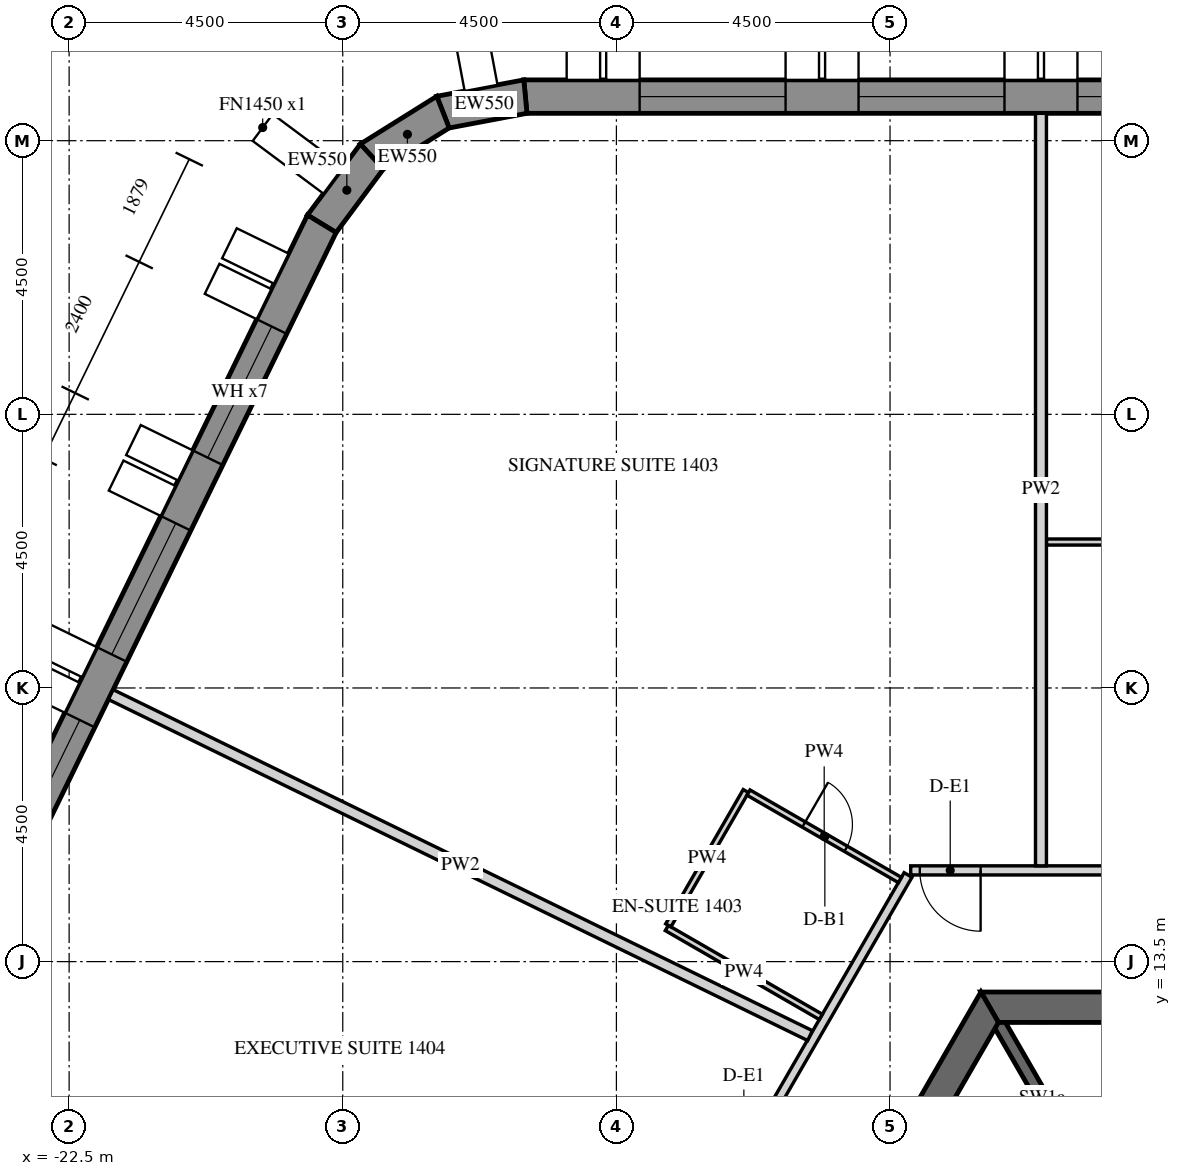
"""IFC4 building model, lengths in metres.
Left out: names, types, materials, properties, quantities, classifications, styles, units other than length and angle.
Written with IfcOpenShell. Run it as: python <this file> out.ifc"""

import sys

from ifc_helpers import new_model, si_unit, direction, frame, frame_2d, origin, place, context, subcontext, project, spatial, polyline, rectangle, outline, extrude, element, fill, save


model = new_model("IFC4")
c1 = context("Model", 3, precision=1e-05, world=origin(), true_north=direction((0.0, 1.0)))
c2 = subcontext(c1, "Body", "Model", "MODEL_VIEW")
j1 = project(units=[si_unit("LENGTHUNIT", "METRE"), si_unit("PLANEANGLEUNIT", "RADIAN")], contexts=[c1])
p1 = place(None, origin())
s1 = spatial("IfcSite", under=j1, at=p1, CompositionType="ELEMENT")
p2 = place(p1, origin())
s2 = spatial("IfcBuilding", under=s1, at=p2, CompositionType="ELEMENT")
p3 = place(p2, frame((0.0, 0.0, 183.9)))
s3 = spatial("IfcBuildingStorey", under=s2, at=p3, CompositionType="ELEMENT", Elevation=183.9)
p4 = place(p3, frame((12.761, 27.725, -0.15), z_axis=(0.0, 0.0, 1.0), x_axis=(-1.0, 0.0, 0.0)))
e1 = element("IfcWall", 1, at=p4, inside=s3, PredefinedType="SOLIDWALL", context=c2, shape_type="SweptSolid", body=[
    extrude(outline(polyline([(-0.022, -0.275), (27.783, -0.275), (27.732, 0.275), (0.022, 0.275), (-0.022, -0.275)])), origin(), (0.0, 0.0, 1.0), 3.9),
])
p5 = place(p4, frame((1.879, 0.0, 1.05)))
e2 = element("IfcOpeningElement", 2, at=p5, cuts=e1, PredefinedType="OPENING", context=c2, shape_type="SweptSolid", body=[
    extrude(rectangle(XDim=2.4, YDim=2.4, at=frame_2d((1.2, 1.2))), frame((0.0, 0.285, 0.0), z_axis=(0.0, -1.0, 0.0), x_axis=(1.0, 0.0, 0.0)), (0.0, 0.0, 1.0), 0.57),
])
p6 = place(p4, frame((5.479, 0.0, 1.05)))
e3 = element("IfcOpeningElement", 3, at=p6, cuts=e1, PredefinedType="OPENING", context=c2, shape_type="SweptSolid", body=[
    extrude(rectangle(XDim=2.4, YDim=2.4, at=frame_2d((1.2, 1.2))), frame((0.0, 0.285, 0.0), z_axis=(0.0, -1.0, 0.0), x_axis=(1.0, 0.0, 0.0)), (0.0, 0.0, 1.0), 0.57),
])
p7 = place(p4, frame((9.079, 0.0, 1.05)))
e4 = element("IfcOpeningElement", 4, at=p7, cuts=e1, PredefinedType="OPENING", context=c2, shape_type="SweptSolid", body=[
    extrude(rectangle(XDim=2.4, YDim=2.4, at=frame_2d((1.2, 1.2))), frame((0.0, 0.285, 0.0), z_axis=(0.0, -1.0, 0.0), x_axis=(1.0, 0.0, 0.0)), (0.0, 0.0, 1.0), 0.57),
])
p8 = place(p4, frame((12.679, 0.0, 1.05)))
e5 = element("IfcOpeningElement", 5, at=p8, cuts=e1, PredefinedType="OPENING", context=c2, shape_type="SweptSolid", body=[
    extrude(rectangle(XDim=2.4, YDim=2.4, at=frame_2d((1.2, 1.2))), frame((0.0, 0.285, 0.0), z_axis=(0.0, -1.0, 0.0), x_axis=(1.0, 0.0, 0.0)), (0.0, 0.0, 1.0), 0.57),
])
p9 = place(p4, frame((16.279, 0.0, 1.05)))
e6 = element("IfcOpeningElement", 6, at=p9, cuts=e1, PredefinedType="OPENING", context=c2, shape_type="SweptSolid", body=[
    extrude(rectangle(XDim=2.4, YDim=2.4, at=frame_2d((1.2, 1.2))), frame((0.0, 0.285, 0.0), z_axis=(0.0, -1.0, 0.0), x_axis=(1.0, 0.0, 0.0)), (0.0, 0.0, 1.0), 0.57),
])
p10 = place(p4, frame((19.879, 0.0, 1.05)))
e7 = element("IfcOpeningElement", 7, at=p10, cuts=e1, PredefinedType="OPENING", context=c2, shape_type="SweptSolid", body=[
    extrude(rectangle(XDim=2.4, YDim=2.4, at=frame_2d((1.2, 1.2))), frame((0.0, 0.285, 0.0), z_axis=(0.0, -1.0, 0.0), x_axis=(1.0, 0.0, 0.0)), (0.0, 0.0, 1.0), 0.57),
])
p11 = place(p4, frame((23.479, 0.0, 1.05)))
e8 = element("IfcOpeningElement", 8, at=p11, cuts=e1, PredefinedType="OPENING", context=c2, shape_type="SweptSolid", body=[
    extrude(rectangle(XDim=2.4, YDim=2.4, at=frame_2d((1.2, 1.2))), frame((0.0, 0.285, 0.0), z_axis=(0.0, -1.0, 0.0), x_axis=(1.0, 0.0, 0.0)), (0.0, 0.0, 1.0), 0.57),
])
p12 = place(p3, frame((-14.997, 27.725, -0.15), z_axis=(0.0, 0.0, 1.0), x_axis=(-0.982705443133, -0.185175624845, 0.0)))
e9 = element("IfcWall", 9, at=p12, inside=s3, PredefinedType="SOLIDWALL", context=c2, shape_type="SweptSolid", body=[
    extrude(outline(polyline([(-0.026, -0.275), (1.431, -0.275), (1.327, 0.275), (0.026, 0.275), (-0.026, -0.275)])), origin(), (0.0, 0.0, 1.0), 3.9),
])
p13 = place(p3, frame((-16.352, 27.47, -0.15), z_axis=(0.0, 0.0, 1.0), x_axis=(-0.848057977594, -0.5299034503, 0.0)))
e10 = element("IfcWall", 10, at=p13, inside=s3, PredefinedType="SOLIDWALL", context=c2, shape_type="SweptSolid", body=[
    extrude(outline(polyline([(-0.052, -0.275), (1.431, -0.275), (1.327, 0.275), (0.052, 0.275), (-0.052, -0.275)])), origin(), (0.0, 0.0, 1.0), 3.9),
])
p14 = place(p3, frame((-17.521, 26.739, -0.15), z_axis=(0.0, 0.0, 1.0), x_axis=(-0.597135295884, -0.802140535324, 0.0)))
e11 = element("IfcWall", 11, at=p14, inside=s3, PredefinedType="SOLIDWALL", context=c2, shape_type="SweptSolid", body=[
    extrude(outline(polyline([(-0.052, -0.275), (1.405, -0.275), (1.354, 0.275), (0.052, 0.275), (-0.052, -0.275)])), origin(), (0.0, 0.0, 1.0), 3.9),
])
p15 = place(p3, frame((-18.345, 25.633, -0.15), z_axis=(0.0, 0.0, 1.0), x_axis=(-0.43837181828, -0.898793718791, 0.0)))
e12 = element("IfcWall", 12, at=p15, inside=s3, PredefinedType="SOLIDWALL", context=c2, shape_type="SweptSolid", body=[
    extrude(outline(polyline([(-0.026, -0.275), (27.78, -0.275), (27.735, 0.275), (0.026, 0.275), (-0.026, -0.275)])), origin(), (0.0, 0.0, 1.0), 3.9),
])
p16 = place(p15, frame((1.879, 0.0, 1.05)))
e13 = element("IfcOpeningElement", 13, at=p16, cuts=e12, PredefinedType="OPENING", context=c2, shape_type="SweptSolid", body=[
    extrude(rectangle(XDim=2.4, YDim=2.4, at=frame_2d((1.2, 1.2))), frame((0.0, 0.285, 0.0), z_axis=(0.0, -1.0, 0.0), x_axis=(1.0, 0.0, 0.0)), (0.0, 0.0, 1.0), 0.57),
])
p17 = place(p15, frame((5.479, 0.0, 1.05)))
e14 = element("IfcOpeningElement", 14, at=p17, cuts=e12, PredefinedType="OPENING", context=c2, shape_type="SweptSolid", body=[
    extrude(rectangle(XDim=2.4, YDim=2.4, at=frame_2d((1.2, 1.2))), frame((0.0, 0.285, 0.0), z_axis=(0.0, -1.0, 0.0), x_axis=(1.0, 0.0, 0.0)), (0.0, 0.0, 1.0), 0.57),
])
p18 = place(p15, frame((9.079, 0.0, 1.05)))
e15 = element("IfcOpeningElement", 15, at=p18, cuts=e12, PredefinedType="OPENING", context=c2, shape_type="SweptSolid", body=[
    extrude(rectangle(XDim=2.4, YDim=2.4, at=frame_2d((1.2, 1.2))), frame((0.0, 0.285, 0.0), z_axis=(0.0, -1.0, 0.0), x_axis=(1.0, 0.0, 0.0)), (0.0, 0.0, 1.0), 0.57),
])
p19 = place(p15, frame((12.679, 0.0, 1.05)))
e16 = element("IfcOpeningElement", 16, at=p19, cuts=e12, PredefinedType="OPENING", context=c2, shape_type="SweptSolid", body=[
    extrude(rectangle(XDim=2.4, YDim=2.4, at=frame_2d((1.2, 1.2))), frame((0.0, 0.285, 0.0), z_axis=(0.0, -1.0, 0.0), x_axis=(1.0, 0.0, 0.0)), (0.0, 0.0, 1.0), 0.57),
])
p20 = place(p15, frame((16.279, 0.0, 1.05)))
e17 = element("IfcOpeningElement", 17, at=p20, cuts=e12, PredefinedType="OPENING", context=c2, shape_type="SweptSolid", body=[
    extrude(rectangle(XDim=2.4, YDim=2.4, at=frame_2d((1.2, 1.2))), frame((0.0, 0.285, 0.0), z_axis=(0.0, -1.0, 0.0), x_axis=(1.0, 0.0, 0.0)), (0.0, 0.0, 1.0), 0.57),
])
p21 = place(p15, frame((19.879, 0.0, 1.05)))
e18 = element("IfcOpeningElement", 18, at=p21, cuts=e12, PredefinedType="OPENING", context=c2, shape_type="SweptSolid", body=[
    extrude(rectangle(XDim=2.4, YDim=2.4, at=frame_2d((1.2, 1.2))), frame((0.0, 0.285, 0.0), z_axis=(0.0, -1.0, 0.0), x_axis=(1.0, 0.0, 0.0)), (0.0, 0.0, 1.0), 0.57),
])
p22 = place(p15, frame((23.479, 0.0, 1.05)))
e19 = element("IfcOpeningElement", 19, at=p22, cuts=e12, PredefinedType="OPENING", context=c2, shape_type="SweptSolid", body=[
    extrude(rectangle(XDim=2.4, YDim=2.4, at=frame_2d((1.2, 1.2))), frame((0.0, 0.285, 0.0), z_axis=(0.0, -1.0, 0.0), x_axis=(1.0, 0.0, 0.0)), (0.0, 0.0, 1.0), 0.57),
])
p23 = place(p3, frame((-7.361, 12.75, -0.15), z_axis=(0.0, 0.0, 1.0), x_axis=(-0.50000571537, -0.866022103989, 0.0)))
e20 = element("IfcWall", 20, at=p23, inside=s3, PredefinedType="SHEAR", context=c2, shape_type="SweptSolid", body=[
    extrude(outline(polyline([(-0.144, -0.25), (14.867, -0.25), (14.578, 0.25), (0.144, 0.25), (-0.144, -0.25)])), origin(), (0.0, 0.0, 1.0), 3.9),
])
p24 = place(p23, frame((6.49, 0.0, 0.15)))
e21 = element("IfcOpeningElement", 21, at=p24, cuts=e20, PredefinedType="OPENING", context=c2, shape_type="SweptSolid", body=[
    extrude(rectangle(XDim=1.8, YDim=2.4, at=frame_2d((0.9, 1.2))), frame((0.0, 0.26, 0.0), z_axis=(0.0, -1.0, 0.0), x_axis=(1.0, 0.0, 0.0)), (0.0, 0.0, 1.0), 0.52),
])
p25 = place(p3, frame((7.361, 12.75, -0.15), z_axis=(0.0, 0.0, 1.0), x_axis=(-1.0, 0.0, 0.0)))
e22 = element("IfcWall", 22, at=p25, inside=s3, PredefinedType="SHEAR", context=c2, shape_type="SweptSolid", body=[
    extrude(outline(polyline([(-0.144, -0.25), (14.866, -0.25), (14.578, 0.25), (0.144, 0.25), (-0.144, -0.25)])), origin(), (0.0, 0.0, 1.0), 3.9),
])
p26 = place(p25, frame((6.761, 0.0, 0.15)))
e23 = element("IfcOpeningElement", 23, at=p26, cuts=e22, PredefinedType="OPENING", context=c2, shape_type="SweptSolid", body=[
    extrude(rectangle(XDim=1.2, YDim=2.4, at=frame_2d((0.6, 1.2))), frame((0.0, 0.26, 0.0), z_axis=(0.0, -1.0, 0.0), x_axis=(1.0, 0.0, 0.0)), (0.0, 0.0, 1.0), 0.52),
])
p27 = place(p3, frame((-5.773, 10.0, -0.15), z_axis=(0.0, 0.0, 1.0), x_axis=(-0.499995765644, 0.866027848477, 0.0)))
e24 = element("IfcWall", 24, at=p27, inside=s3, PredefinedType="SHEAR", context=c2, shape_type="SweptSolid", body=[
    extrude(rectangle(XDim=2.887, YDim=0.2, at=frame_2d((1.443, 0.0))), origin(), (0.0, 0.0, 1.0), 3.9),
])
p28 = place(p3, frame((6.207, 15.0, 0.0), z_axis=(0.0, 0.0, 1.0), x_axis=(-1.0, 0.0, 0.0)))
e25 = element("IfcWall", 25, at=p28, inside=s3, PredefinedType="PARTITIONING", context=c2, shape_type="SweptSolid", body=[
    extrude(rectangle(XDim=14.867, YDim=0.15, at=frame_2d((7.433, 0.0))), origin(), (0.0, 0.0, 1.0), 2.988),
])
p29 = place(p28, frame((8.224, 0.0, 0.0)))
e26 = element("IfcOpeningElement", 26, at=p29, cuts=e25, PredefinedType="OPENING", context=c2, shape_type="SweptSolid", body=[
    extrude(rectangle(XDim=1.0, YDim=2.1, at=frame_2d((0.5, 1.05))), frame((0.0, 0.085, 0.0), z_axis=(0.0, -1.0, 0.0), x_axis=(1.0, 0.0, 0.0)), (0.0, 0.0, 1.0), 0.17),
])
p30 = place(p28, frame((13.717, 0.0, 0.0)))
e27 = element("IfcOpeningElement", 27, at=p30, cuts=e25, PredefinedType="OPENING", context=c2, shape_type="SweptSolid", body=[
    extrude(rectangle(XDim=1.0, YDim=2.1, at=frame_2d((0.5, 1.05))), frame((0.0, 0.085, 0.0), z_axis=(0.0, -1.0, 0.0), x_axis=(1.0, 0.0, 0.0)), (0.0, 0.0, 1.0), 0.17),
])
p31 = place(p3, frame((-8.704, 14.925, 0.0), z_axis=(0.0, 0.0, 1.0), x_axis=(-0.499998228944, -0.866026426302, 0.0)))
e28 = element("IfcWall", 28, at=p31, inside=s3, PredefinedType="PARTITIONING", context=c2, shape_type="SweptSolid", body=[
    extrude(rectangle(XDim=14.867, YDim=0.15, at=frame_2d((7.433, 0.0))), origin(), (0.0, 0.0, 1.0), 2.988),
])
p32 = place(p31, frame((4.901, 0.0, 0.0)))
e29 = element("IfcOpeningElement", 29, at=p32, cuts=e28, PredefinedType="OPENING", context=c2, shape_type="SweptSolid", body=[
    extrude(rectangle(XDim=1.0, YDim=2.1, at=frame_2d((0.5, 1.05))), frame((0.0, 0.085, 0.0), z_axis=(0.0, -1.0, 0.0), x_axis=(1.0, 0.0, 0.0)), (0.0, 0.0, 1.0), 0.17),
])
p33 = place(p31, frame((13.284, 0.0, 0.0)))
e30 = element("IfcOpeningElement", 30, at=p33, cuts=e28, PredefinedType="OPENING", context=c2, shape_type="SweptSolid", body=[
    extrude(rectangle(XDim=1.0, YDim=2.1, at=frame_2d((0.5, 1.05))), frame((0.0, 0.085, 0.0), z_axis=(0.0, -1.0, 0.0), x_axis=(1.0, 0.0, 0.0)), (0.0, 0.0, 1.0), 0.17),
])
p34 = place(p3, frame((0.632, 20.4, 0.0), z_axis=(0.0, 0.0, 1.0), x_axis=(-1.0, 0.0, 0.0)))
e31 = element("IfcWall", 31, at=p34, inside=s3, PredefinedType="PARTITIONING", context=c2, shape_type="SweptSolid", body=[
    extrude(rectangle(XDim=7.06, YDim=0.1, at=frame_2d((3.53, 0.0))), origin(), (0.0, 0.0, 1.0), 2.988),
])
p35 = place(p34, frame((3.1, 0.0, 0.0)))
e32 = element("IfcOpeningElement", 32, at=p35, cuts=e31, PredefinedType="OPENING", context=c2, shape_type="SweptSolid", body=[
    extrude(rectangle(XDim=0.9, YDim=2.1, at=frame_2d((0.45, 1.05))), frame((0.0, 0.06, 0.0), z_axis=(0.0, -1.0, 0.0), x_axis=(1.0, 0.0, 0.0)), (0.0, 0.0, 1.0), 0.12),
])
p36 = place(p3, frame((-6.518, 27.45, 0.0), z_axis=(0.0, 0.0, 1.0), x_axis=(0.0, -1.0, 0.0)))
e33 = element("IfcWall", 33, at=p36, inside=s3, PredefinedType="PARTITIONING", context=c2, shape_type="SweptSolid", body=[
    extrude(rectangle(XDim=12.375, YDim=0.18, at=frame_2d((6.188, 0.0))), origin(), (0.0, 0.0, 1.0), 2.988),
])
p37 = place(p3, frame((-10.138, 12.591, 0.0), z_axis=(0.0, 0.0, 1.0), x_axis=(-0.866025730634, 0.499999433879, 0.0)))
e34 = element("IfcWall", 34, at=p37, inside=s3, PredefinedType="PARTITIONING", context=c2, shape_type="SweptSolid", body=[
    extrude(rectangle(XDim=2.925, YDim=0.1, at=frame_2d((1.462, 0.0))), origin(), (0.0, 0.0, 1.0), 2.988),
])
p38 = place(p3, frame((-12.646, 14.096, 0.0), z_axis=(0.0, 0.0, 1.0), x_axis=(0.500020783669, 0.866013403995, 0.0)))
e35 = element("IfcWall", 35, at=p38, inside=s3, PredefinedType="PARTITIONING", context=c2, shape_type="SweptSolid", body=[
    extrude(rectangle(XDim=2.55, YDim=0.1, at=frame_2d((1.275, 0.0))), origin(), (0.0, 0.0, 1.0), 2.988),
])
p39 = place(p3, frame((-11.328, 16.28, 0.0), z_axis=(0.0, 0.0, 1.0), x_axis=(0.865981939951, -0.500075274012, 0.0)))
e36 = element("IfcWall", 36, at=p39, inside=s3, PredefinedType="PARTITIONING", context=c2, shape_type="SweptSolid", body=[
    extrude(rectangle(XDim=2.875, YDim=0.1, at=frame_2d((1.438, 0.0))), origin(), (0.0, 0.0, 1.0), 2.988),
])
p40 = place(p39, frame((1.05, 0.0, 0.0)))
e37 = element("IfcOpeningElement", 37, at=p40, cuts=e36, PredefinedType="OPENING", context=c2, shape_type="SweptSolid", body=[
    extrude(rectangle(XDim=0.8, YDim=2.1, at=frame_2d((0.4, 1.05))), frame((0.0, 0.06, 0.0), z_axis=(0.0, -1.0, 0.0), x_axis=(1.0, 0.0, 0.0)), (0.0, 0.0, 1.0), 0.12),
])
p41 = place(p3, frame((-21.815, 17.892, 0.0), z_axis=(0.0, 0.0, 1.0), x_axis=(0.898799253997, -0.438360469265, 0.0)))
e38 = element("IfcWall", 38, at=p41, inside=s3, PredefinedType="PARTITIONING", context=c2, shape_type="SweptSolid", body=[
    extrude(rectangle(XDim=12.794, YDim=0.18, at=frame_2d((6.397, 0.0))), origin(), (0.0, 0.0, 1.0), 2.988),
])
p42 = place(p3, frame((-24.971, 11.42, 0.0), z_axis=(0.0, 0.0, 1.0), x_axis=(0.898797462081, -0.438364143329, 0.0)))
e39 = element("IfcWall", 39, at=p42, inside=s3, PredefinedType="PARTITIONING", context=c2, shape_type="SweptSolid", body=[
    extrude(rectangle(XDim=12.291, YDim=0.18, at=frame_2d((6.145, 0.0))), origin(), (0.0, 0.0, 1.0), 2.988),
])
p43 = place(p9, frame((0.0, 0.205, 0.0)))
e40 = element("IfcWindow", 40, at=p43, inside=s3, PartitioningType="DOUBLE_PANEL_VERTICAL", PredefinedType="WINDOW", context=c2, shape_type="SweptSolid", body=[
    extrude(rectangle(XDim=2.4, YDim=2.4, at=frame_2d((1.2, 1.2))), frame((0.0, 0.03, 0.0), z_axis=(0.0, -1.0, 0.0), x_axis=(1.0, 0.0, 0.0)), (0.0, 0.0, 1.0), 0.06),
])
fill(e6, e40)
p44 = place(p10, frame((0.0, 0.205, 0.0)))
e41 = element("IfcWindow", 41, at=p44, inside=s3, PartitioningType="DOUBLE_PANEL_VERTICAL", PredefinedType="WINDOW", context=c2, shape_type="SweptSolid", body=[
    extrude(rectangle(XDim=2.4, YDim=2.4, at=frame_2d((1.2, 1.2))), frame((0.0, 0.03, 0.0), z_axis=(0.0, -1.0, 0.0), x_axis=(1.0, 0.0, 0.0)), (0.0, 0.0, 1.0), 0.06),
])
fill(e7, e41)
p45 = place(p11, frame((0.0, 0.205, 0.0)))
e42 = element("IfcWindow", 42, at=p45, inside=s3, PartitioningType="DOUBLE_PANEL_VERTICAL", PredefinedType="WINDOW", context=c2, shape_type="SweptSolid", body=[
    extrude(rectangle(XDim=2.4, YDim=2.4, at=frame_2d((1.2, 1.2))), frame((0.0, 0.03, 0.0), z_axis=(0.0, -1.0, 0.0), x_axis=(1.0, 0.0, 0.0)), (0.0, 0.0, 1.0), 0.06),
])
fill(e8, e42)
p46 = place(p16, frame((0.0, 0.205, 0.0)))
e43 = element("IfcWindow", 43, at=p46, inside=s3, PartitioningType="DOUBLE_PANEL_VERTICAL", PredefinedType="WINDOW", context=c2, shape_type="SweptSolid", body=[
    extrude(rectangle(XDim=2.4, YDim=2.4, at=frame_2d((1.2, 1.2))), frame((0.0, 0.03, 0.0), z_axis=(0.0, -1.0, 0.0), x_axis=(1.0, 0.0, 0.0)), (0.0, 0.0, 1.0), 0.06),
])
fill(e13, e43)
p47 = place(p17, frame((0.0, 0.205, 0.0)))
e44 = element("IfcWindow", 44, at=p47, inside=s3, PartitioningType="DOUBLE_PANEL_VERTICAL", PredefinedType="WINDOW", context=c2, shape_type="SweptSolid", body=[
    extrude(rectangle(XDim=2.4, YDim=2.4, at=frame_2d((1.2, 1.2))), frame((0.0, 0.03, 0.0), z_axis=(0.0, -1.0, 0.0), x_axis=(1.0, 0.0, 0.0)), (0.0, 0.0, 1.0), 0.06),
])
fill(e14, e44)
p48 = place(p18, frame((0.0, 0.205, 0.0)))
e45 = element("IfcWindow", 45, at=p48, inside=s3, PartitioningType="DOUBLE_PANEL_VERTICAL", PredefinedType="WINDOW", context=c2, shape_type="SweptSolid", body=[
    extrude(rectangle(XDim=2.4, YDim=2.4, at=frame_2d((1.2, 1.2))), frame((0.0, 0.03, 0.0), z_axis=(0.0, -1.0, 0.0), x_axis=(1.0, 0.0, 0.0)), (0.0, 0.0, 1.0), 0.06),
])
fill(e15, e45)
p49 = place(p30, origin())
e46 = element("IfcDoor", 46, at=p49, inside=s3, OperationType="SINGLE_SWING_LEFT", PredefinedType="DOOR", context=c2, shape_type="SweptSolid", body=[
    extrude(rectangle(XDim=1.0, YDim=2.1, at=frame_2d((0.5, 1.05))), frame((0.0, 0.025, 0.0), z_axis=(0.0, -1.0, 0.0), x_axis=(1.0, 0.0, 0.0)), (0.0, 0.0, 1.0), 0.05),
])
fill(e27, e46)
p50 = place(p40, origin())
e47 = element("IfcDoor", 47, at=p50, inside=s3, OperationType="SINGLE_SWING_LEFT", PredefinedType="DOOR", context=c2, shape_type="SweptSolid", body=[
    extrude(rectangle(XDim=0.8, YDim=2.1, at=frame_2d((0.4, 1.05))), frame((0.0, 0.025, 0.0), z_axis=(0.0, -1.0, 0.0), x_axis=(1.0, 0.0, 0.0)), (0.0, 0.0, 1.0), 0.05),
])
fill(e37, e47)
save(model, sys.argv[1])
